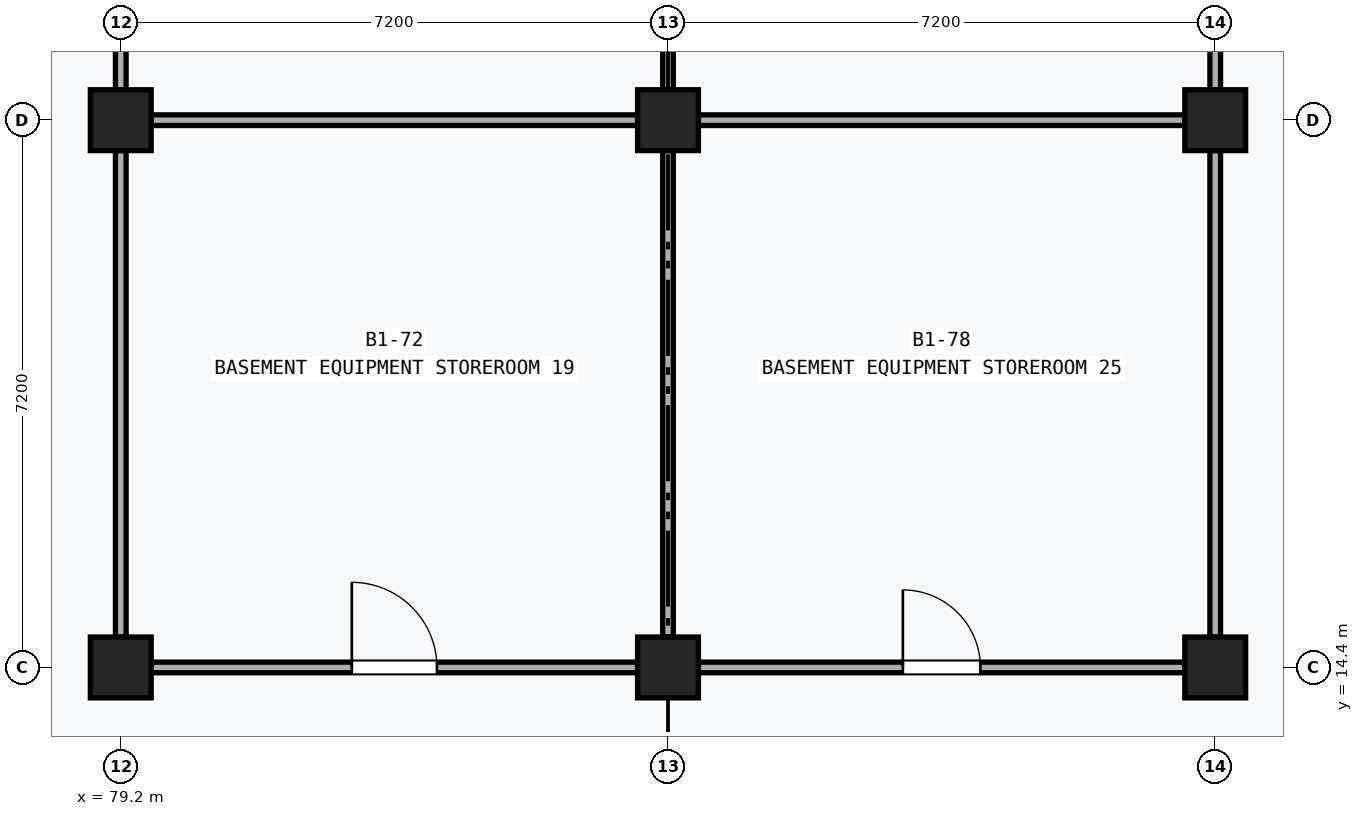
"""IFC4 building model, lengths in metres.
Left out: names, types, materials, properties, quantities, classifications, styles, units other than length and angle.
Written with IfcOpenShell. Run it as: python <this file> out.ifc"""

import sys

from ifc_helpers import new_model, si_unit, direction, frame, frame_2d, origin, origin_2d, place, context, subcontext, project, spatial, rectangle, extrude, element, fill, save


model = new_model("IFC4")
c1 = context("Model", 3, precision=1e-05, world=origin(), true_north=direction((0.0, 1.0)))
c2 = subcontext(c1, "Body", "Model", "MODEL_VIEW")
j1 = project(units=[si_unit("LENGTHUNIT", "METRE"), si_unit("PLANEANGLEUNIT", "RADIAN")], contexts=[c1])
p1 = place(None, origin())
s1 = spatial("IfcSite", under=j1, at=p1, CompositionType="ELEMENT")
p2 = place(p1, origin())
s2 = spatial("IfcBuilding", under=s1, at=p2, CompositionType="ELEMENT")
p3 = place(p2, frame((0.0, 0.0, -4.5)))
s3 = spatial("IfcBuildingStorey", under=s2, at=p3, CompositionType="ELEMENT", Elevation=-4.5)
for number, where, z_axis, x_axis in (
    (1, (79.2, 14.4, 0.0), (0.0, 0.0, 1.0), (1.0, 0.0, 0.0)),
    (2, (79.2, 21.6, 0.0), (0.0, 0.0, 1.0), (1.0, 0.0, 0.0)),
    (3, (86.4, 14.4, 0.0), (0.0, 0.0, 1.0), (1.0, 0.0, 0.0)),
    (4, (86.4, 21.6, 0.0), (0.0, 0.0, 1.0), (1.0, 0.0, 0.0)),
    (5, (93.6, 14.4, 0.0), (0.0, 0.0, 1.0), (1.0, 0.0, 0.0)),
    (6, (93.6, 21.6, 0.0), (0.0, 0.0, 1.0), (1.0, 0.0, 0.0)),
):
    element("IfcColumn", number, at=place(p3, frame(where, z_axis=z_axis, x_axis=x_axis)), inside=s3, PredefinedType="COLUMN", context=c2, shape_type="SweptSolid", body=[
        extrude(rectangle(XDim=0.8, YDim=0.8, at=origin_2d()), origin(), (0.0, 0.0, 1.0), 4.5),
    ])
p4 = place(p3, frame((79.6, 14.4, 0.0), z_axis=(0.0, 0.0, 1.0), x_axis=(1.0, 0.0, 0.0)))
e7 = element("IfcWall", 7, at=p4, inside=s3, PredefinedType="PARTITIONING", context=c2, shape_type="SweptSolid", body=[
    extrude(rectangle(XDim=6.4, YDim=0.14, at=frame_2d((3.2, 0.0))), origin(), (0.0, 0.0, 1.0), 3.3),
])
p5 = place(p4, frame((2.64, 0.0, 0.0)))
e8 = element("IfcOpeningElement", 8, at=p5, cuts=e7, PredefinedType="OPENING", context=c2, shape_type="SweptSolid", body=[
    extrude(rectangle(XDim=1.12, YDim=2.2, at=frame_2d((0.56, 1.1))), frame((0.0, 0.082, 0.0), z_axis=(0.0, -1.0, 0.0), x_axis=(1.0, 0.0, 0.0)), (0.0, 0.0, 1.0), 0.164),
])
for number, where, z_axis, x_axis in (
    (9, (79.6, 21.6, 0.0), (0.0, 0.0, 1.0), (1.0, 0.0, 0.0)),
    (10, (79.2, 14.8, 0.0), (0.0, 0.0, 1.0), (0.0, 1.0, 0.0)),
    (11, (86.4, 14.8, 0.0), (0.0, 0.0, 1.0), (0.0, 1.0, 0.0)),
):
    element("IfcWall", number, at=place(p3, frame(where, z_axis=z_axis, x_axis=x_axis)), inside=s3, PredefinedType="PARTITIONING", context=c2, shape_type="SweptSolid", body=[
        extrude(rectangle(XDim=6.4, YDim=0.14, at=frame_2d((3.2, 0.0))), origin(), (0.0, 0.0, 1.0), 3.3),
    ])
p6 = place(p3, frame((79.2, 22.0, 0.0), z_axis=(0.0, 0.0, 1.0), x_axis=(0.0, 1.0, 0.0)))
e12 = element("IfcWall", 12, at=p6, inside=s3, PredefinedType="PARTITIONING", context=c2, shape_type="SweptSolid", body=[
    extrude(rectangle(XDim=6.4, YDim=0.14, at=frame_2d((3.2, 0.0))), origin(), (0.0, 0.0, 1.0), 3.3),
])
p7 = place(p6, frame((2.62, 0.0, 0.0)))
e13 = element("IfcOpeningElement", 13, at=p7, cuts=e12, PredefinedType="OPENING", context=c2, shape_type="SweptSolid", body=[
    extrude(rectangle(XDim=1.16, YDim=2.22, at=frame_2d((0.58, 1.11))), frame((0.0, 0.082, 0.0), z_axis=(0.0, -1.0, 0.0), x_axis=(1.0, 0.0, 0.0)), (0.0, 0.0, 1.0), 0.164),
])
p8 = place(p3, frame((86.4, 22.0, 0.0), z_axis=(0.0, 0.0, 1.0), x_axis=(0.0, 1.0, 0.0)))
e14 = element("IfcWall", 14, at=p8, inside=s3, PredefinedType="PARTITIONING", context=c2, shape_type="SweptSolid", body=[
    extrude(rectangle(XDim=6.4, YDim=0.14, at=frame_2d((3.2, 0.0))), origin(), (0.0, 0.0, 1.0), 3.3),
])
p9 = place(p3, frame((86.8, 14.4, 0.0), z_axis=(0.0, 0.0, 1.0), x_axis=(1.0, 0.0, 0.0)))
e15 = element("IfcWall", 15, at=p9, inside=s3, PredefinedType="PARTITIONING", context=c2, shape_type="SweptSolid", body=[
    extrude(rectangle(XDim=6.4, YDim=0.14, at=frame_2d((3.2, 0.0))), origin(), (0.0, 0.0, 1.0), 3.3),
])
p10 = place(p9, frame((2.69, 0.0, 0.0)))
e16 = element("IfcOpeningElement", 16, at=p10, cuts=e15, PredefinedType="OPENING", context=c2, shape_type="SweptSolid", body=[
    extrude(rectangle(XDim=1.02, YDim=2.12, at=frame_2d((0.51, 1.06))), frame((0.0, 0.082, 0.0), z_axis=(0.0, -1.0, 0.0), x_axis=(1.0, 0.0, 0.0)), (0.0, 0.0, 1.0), 0.164),
])
for number, where, z_axis, x_axis in (
    (17, (86.8, 21.6, 0.0), (0.0, 0.0, 1.0), (1.0, 0.0, 0.0)),
    (18, (93.6, 14.8, 0.0), (0.0, 0.0, 1.0), (0.0, 1.0, 0.0)),
):
    element("IfcWall", number, at=place(p3, frame(where, z_axis=z_axis, x_axis=x_axis)), inside=s3, PredefinedType="PARTITIONING", context=c2, shape_type="SweptSolid", body=[
        extrude(rectangle(XDim=6.4, YDim=0.14, at=frame_2d((3.2, 0.0))), origin(), (0.0, 0.0, 1.0), 3.3),
    ])
p11 = place(p3, frame((93.6, 22.0, 0.0), z_axis=(0.0, 0.0, 1.0), x_axis=(0.0, 1.0, 0.0)))
e19 = element("IfcWall", 19, at=p11, inside=s3, PredefinedType="PARTITIONING", context=c2, shape_type="SweptSolid", body=[
    extrude(rectangle(XDim=6.4, YDim=0.14, at=frame_2d((3.2, 0.0))), origin(), (0.0, 0.0, 1.0), 3.3),
])
p12 = place(p11, frame((2.68, 0.0, 0.0)))
e20 = element("IfcOpeningElement", 20, at=p12, cuts=e19, PredefinedType="OPENING", context=c2, shape_type="SweptSolid", body=[
    extrude(rectangle(XDim=1.04, YDim=2.14, at=frame_2d((0.52, 1.07))), frame((0.0, 0.082, 0.0), z_axis=(0.0, -1.0, 0.0), x_axis=(1.0, 0.0, 0.0)), (0.0, 0.0, 1.0), 0.164),
])
p13 = place(p5, origin())
e21 = element("IfcDoor", 21, at=p13, inside=s3, OperationType="SINGLE_SWING_LEFT", PredefinedType="DOOR", context=c2, shape_type="SweptSolid", body=[
    extrude(rectangle(XDim=1.12, YDim=2.2, at=frame_2d((0.56, 1.1))), frame((0.0, 0.025, 0.0), z_axis=(0.0, -1.0, 0.0), x_axis=(1.0, 0.0, 0.0)), (0.0, 0.0, 1.0), 0.05),
])
fill(e8, e21)
p14 = place(p10, origin())
e22 = element("IfcDoor", 22, at=p14, inside=s3, OperationType="SINGLE_SWING_LEFT", PredefinedType="DOOR", context=c2, shape_type="SweptSolid", body=[
    extrude(rectangle(XDim=1.02, YDim=2.12, at=frame_2d((0.51, 1.06))), frame((0.0, 0.025, 0.0), z_axis=(0.0, -1.0, 0.0), x_axis=(1.0, 0.0, 0.0)), (0.0, 0.0, 1.0), 0.05),
])
fill(e16, e22)
save(model, sys.argv[1])
